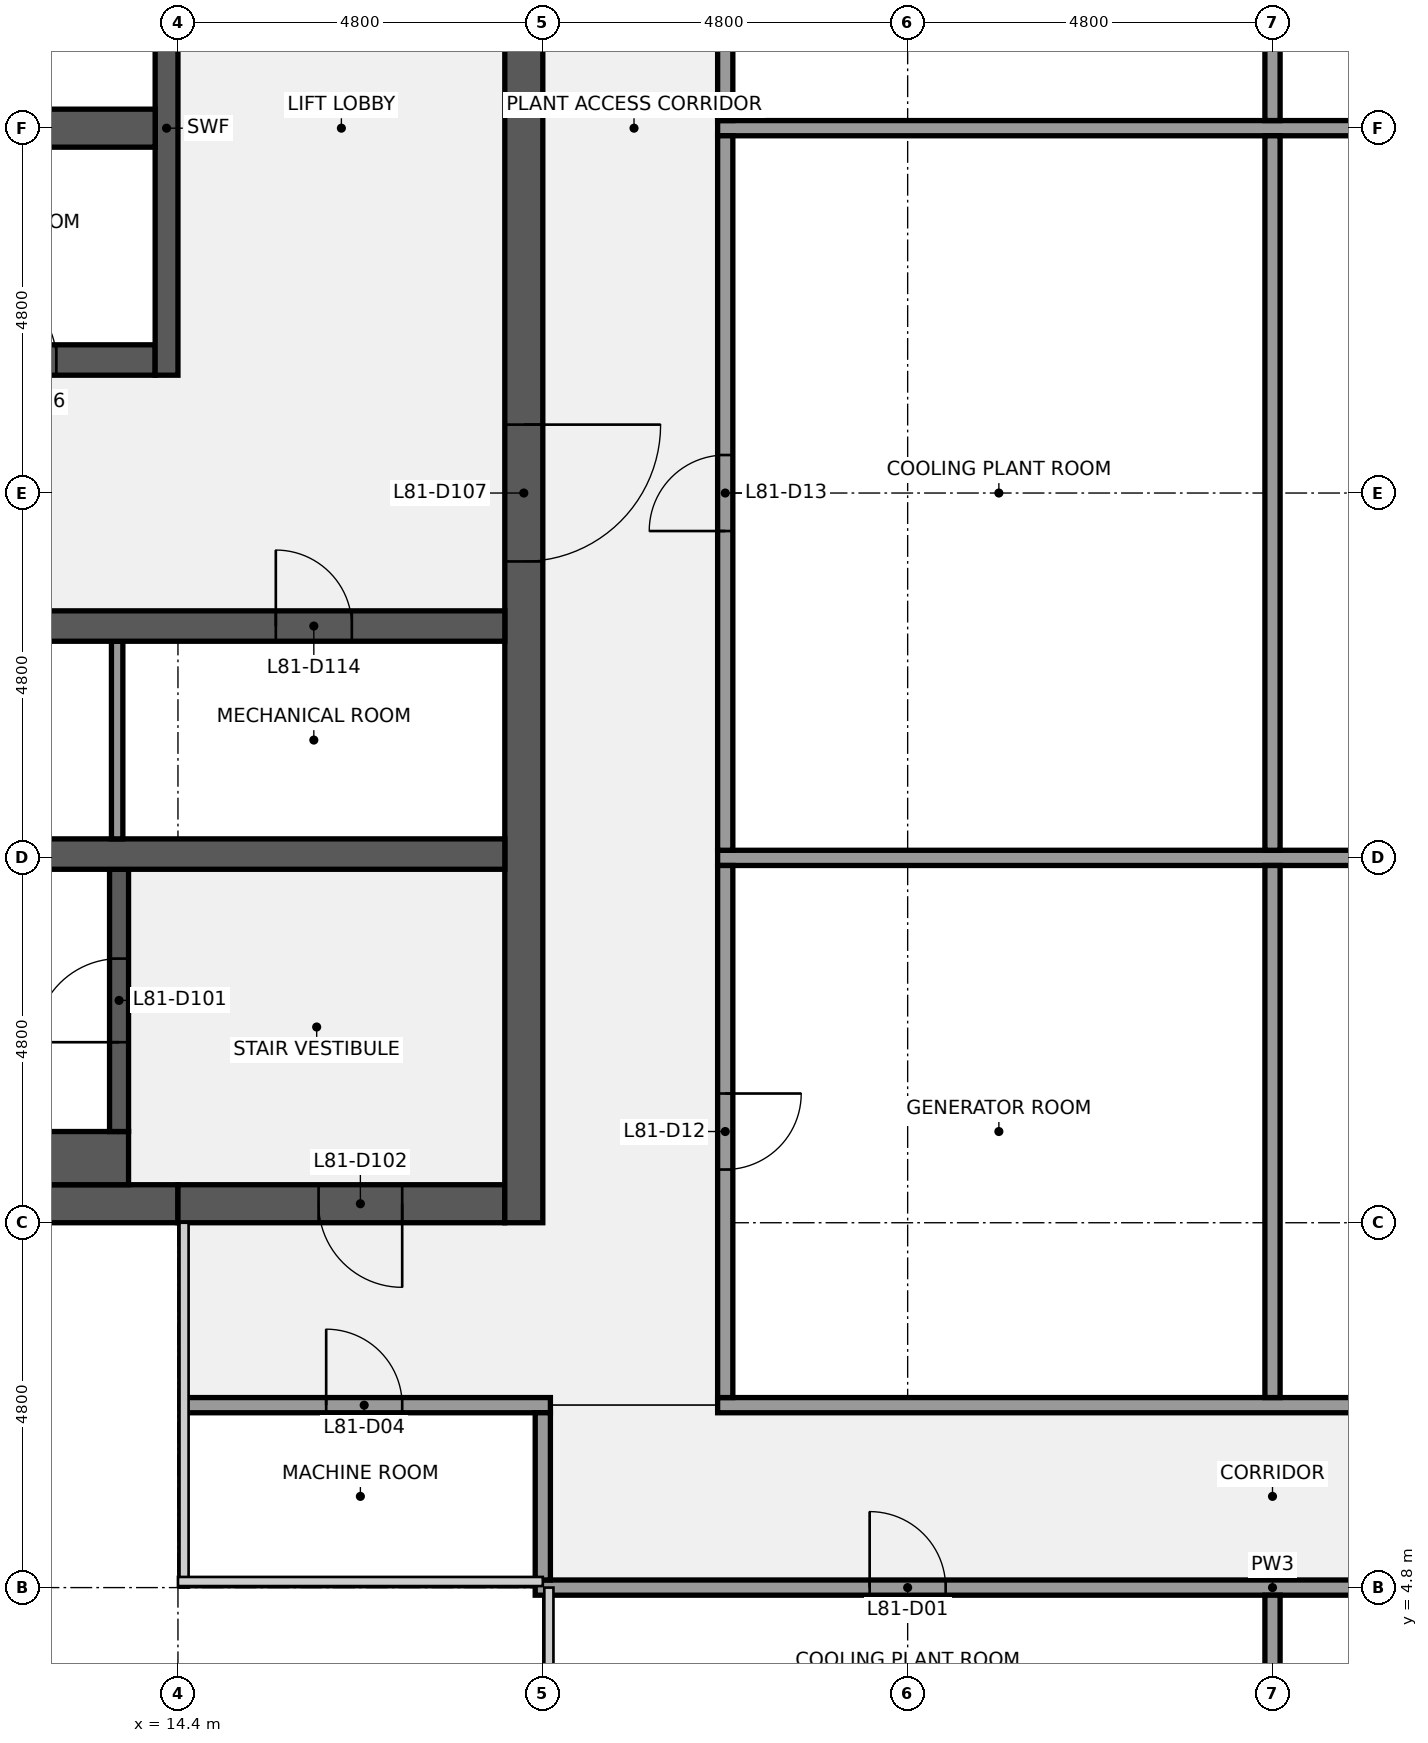
"""IFC4 building model, lengths in metres.
Left out: names, types, materials, properties, quantities, classifications, styles, units other than length and angle.
Written with IfcOpenShell. Run it as: python <this file> out.ifc"""

import sys

from ifc_helpers import new_model, si_unit, direction, frame, frame_2d, origin, place, context, subcontext, project, spatial, rectangle, extrude, element, fill, save


model = new_model("IFC4")
c1 = context("Model", 3, precision=1e-05, world=origin(), true_north=direction((0.0, 1.0)))
c2 = subcontext(c1, "Body", "Model", "MODEL_VIEW")
j1 = project(units=[si_unit("LENGTHUNIT", "METRE"), si_unit("PLANEANGLEUNIT", "RADIAN")], contexts=[c1])
p1 = place(None, origin())
s1 = spatial("IfcSite", under=j1, at=p1, CompositionType="ELEMENT")
p2 = place(p1, origin())
s2 = spatial("IfcBuilding", under=s1, at=p2, CompositionType="ELEMENT")
p3 = place(p2, frame((0.0, 0.0, 362.3)))
s3 = spatial("IfcBuildingStorey", under=s2, at=p3, CompositionType="ELEMENT", Elevation=362.3)
p4 = place(p3, frame((14.4, 9.85, 0.0), z_axis=(0.0, 0.0, 1.0), x_axis=(-1.0, 0.0, 0.0)))
e1 = element("IfcWall", 1, at=p4, inside=s3, PredefinedType="SHEAR", context=c2, shape_type="SweptSolid", body=[
    extrude(rectangle(XDim=13.9, YDim=0.5, at=frame_2d((6.95, 0.0))), origin(), (0.0, 0.0, 1.0), 3.75),
])
p5 = place(p3, frame((18.7, 9.85, 0.0), z_axis=(0.0, 0.0, 1.0), x_axis=(-1.0, 0.0, 0.0)))
e2 = element("IfcWall", 2, at=p5, inside=s3, PredefinedType="SHEAR", context=c2, shape_type="SweptSolid", body=[
    extrude(rectangle(XDim=4.3, YDim=0.5, at=frame_2d((2.15, 0.0))), origin(), (0.0, 0.0, 1.0), 3.75),
])
p6 = place(p5, frame((1.35, 0.0, 0.0)))
e3 = element("IfcOpeningElement", 3, at=p6, cuts=e2, PredefinedType="OPENING", context=c2, shape_type="SweptSolid", body=[
    extrude(rectangle(XDim=1.1, YDim=2.1, at=frame_2d((0.55, 1.05))), frame((0.0, 0.26, 0.0), z_axis=(0.0, -1.0, 0.0), x_axis=(1.0, 0.0, 0.0)), (0.0, 0.0, 1.0), 0.52),
])
p7 = place(p3, frame((18.95, 38.4, 0.0), z_axis=(0.0, 0.0, 1.0), x_axis=(0.0, -1.0, 0.0)))
e4 = element("IfcWall", 4, at=p7, inside=s3, PredefinedType="SHEAR", context=c2, shape_type="SweptSolid", body=[
    extrude(rectangle(XDim=28.8, YDim=0.5, at=frame_2d((14.4, 0.0))), origin(), (0.0, 0.0, 1.0), 3.75),
])
p8 = place(p7, frame((18.3, 0.0, 0.0)))
e5 = element("IfcOpeningElement", 5, at=p8, cuts=e4, PredefinedType="OPENING", context=c2, shape_type="SweptSolid", body=[
    extrude(rectangle(XDim=1.8, YDim=2.1, at=frame_2d((0.9, 1.05))), frame((0.0, 0.26, 0.0), z_axis=(0.0, -1.0, 0.0), x_axis=(1.0, 0.0, 0.0)), (0.0, 0.0, 1.0), 0.52),
])
p9 = place(p7, frame((8.7, 0.0, 0.0)))
e6 = element("IfcOpeningElement", 6, at=p9, cuts=e4, PredefinedType="OPENING", context=c2, shape_type="SweptSolid", body=[
    extrude(rectangle(XDim=1.8, YDim=2.1, at=frame_2d((0.9, 1.05))), frame((0.0, 0.26, 0.0), z_axis=(0.0, -1.0, 0.0), x_axis=(1.0, 0.0, 0.0)), (0.0, 0.0, 1.0), 0.52),
])
p10 = place(p3, frame((6.25, 10.45, 0.0), z_axis=(0.0, 0.0, 1.0), x_axis=(1.0, 0.0, 0.0)))
e7 = element("IfcWall", 7, at=p10, inside=s3, PredefinedType="SHEAR", context=c2, shape_type="SweptSolid", body=[
    extrude(rectangle(XDim=7.5, YDim=0.7, at=frame_2d((3.75, 0.0))), origin(), (0.0, 0.0, 1.0), 3.75),
])
p11 = place(p3, frame((13.625, 10.8, 0.0), z_axis=(0.0, 0.0, 1.0), x_axis=(0.0, 1.0, 0.0)))
e8 = element("IfcWall", 8, at=p11, inside=s3, PredefinedType="SHEAR", context=c2, shape_type="SweptSolid", body=[
    extrude(rectangle(XDim=3.45, YDim=0.25, at=frame_2d((1.725, 0.0))), origin(), (0.0, 0.0, 1.0), 3.75),
])
p12 = place(p11, frame((1.175, 0.0, 0.0)))
e9 = element("IfcOpeningElement", 9, at=p12, cuts=e8, PredefinedType="OPENING", context=c2, shape_type="SweptSolid", body=[
    extrude(rectangle(XDim=1.1, YDim=2.1, at=frame_2d((0.55, 1.05))), frame((0.0, 0.135, 0.0), z_axis=(0.0, -1.0, 0.0), x_axis=(1.0, 0.0, 0.0)), (0.0, 0.0, 1.0), 0.27),
])
p13 = place(p3, frame((0.5, 14.45, 0.0), z_axis=(0.0, 0.0, 1.0), x_axis=(1.0, 0.0, 0.0)))
e10 = element("IfcWall", 10, at=p13, inside=s3, PredefinedType="SHEAR", context=c2, shape_type="SweptSolid", body=[
    extrude(rectangle(XDim=18.2, YDim=0.4, at=frame_2d((9.1, 0.0))), origin(), (0.0, 0.0, 1.0), 3.75),
])
p14 = place(p3, frame((13.6, 14.65, 0.0), z_axis=(0.0, 0.0, 1.0), x_axis=(0.0, 1.0, 0.0)))
e11 = element("IfcWall", 11, at=p14, inside=s3, PredefinedType="PARTITIONING", context=c2, shape_type="SweptSolid", body=[
    extrude(rectangle(XDim=2.6, YDim=0.15, at=frame_2d((1.3, 0.0))), origin(), (0.0, 0.0, 1.0), 3.75),
])
p15 = place(p3, frame((0.5, 17.45, 0.0), z_axis=(0.0, 0.0, 1.0), x_axis=(1.0, 0.0, 0.0)))
e12 = element("IfcWall", 12, at=p15, inside=s3, PredefinedType="SHEAR", context=c2, shape_type="SweptSolid", body=[
    extrude(rectangle(XDim=18.2, YDim=0.4, at=frame_2d((9.1, 0.0))), origin(), (0.0, 0.0, 1.0), 3.75),
])
p16 = place(p15, frame((3.613, 0.0, 0.0)))
e13 = element("IfcOpeningElement", 13, at=p16, cuts=e12, PredefinedType="OPENING", context=c2, shape_type="SweptSolid", body=[
    extrude(rectangle(XDim=1.0, YDim=2.1, at=frame_2d((0.5, 1.05))), frame((0.0, 0.21, 0.0), z_axis=(0.0, -1.0, 0.0), x_axis=(1.0, 0.0, 0.0)), (0.0, 0.0, 1.0), 0.42),
])
p17 = place(p15, frame((10.2, 0.0, 0.0)))
e14 = element("IfcOpeningElement", 14, at=p17, cuts=e12, PredefinedType="OPENING", context=c2, shape_type="SweptSolid", body=[
    extrude(rectangle(XDim=1.0, YDim=2.1, at=frame_2d((0.5, 1.05))), frame((0.0, 0.21, 0.0), z_axis=(0.0, -1.0, 0.0), x_axis=(1.0, 0.0, 0.0)), (0.0, 0.0, 1.0), 0.42),
])
p18 = place(p15, frame((15.188, 0.0, 0.0)))
e15 = element("IfcOpeningElement", 15, at=p18, cuts=e12, PredefinedType="OPENING", context=c2, shape_type="SweptSolid", body=[
    extrude(rectangle(XDim=1.0, YDim=2.1, at=frame_2d((0.5, 1.05))), frame((0.0, 0.21, 0.0), z_axis=(0.0, -1.0, 0.0), x_axis=(1.0, 0.0, 0.0)), (0.0, 0.0, 1.0), 0.42),
])
p19 = place(p3, frame((0.5, 20.95, 0.0), z_axis=(0.0, 0.0, 1.0), x_axis=(1.0, 0.0, 0.0)))
e16 = element("IfcWall", 16, at=p19, inside=s3, PredefinedType="SHEAR", context=c2, shape_type="SweptSolid", body=[
    extrude(rectangle(XDim=13.6, YDim=0.4, at=frame_2d((6.8, 0.0))), origin(), (0.0, 0.0, 1.0), 3.75),
])
p20 = place(p19, frame((6.35, 0.0, 0.0)))
e17 = element("IfcOpeningElement", 17, at=p20, cuts=e16, PredefinedType="OPENING", context=c2, shape_type="SweptSolid", body=[
    extrude(rectangle(XDim=1.1, YDim=2.1, at=frame_2d((0.55, 1.05))), frame((0.0, 0.21, 0.0), z_axis=(0.0, -1.0, 0.0), x_axis=(1.0, 0.0, 0.0)), (0.0, 0.0, 1.0), 0.42),
])
p21 = place(p19, frame((11.3, 0.0, 0.0)))
e18 = element("IfcOpeningElement", 18, at=p21, cuts=e16, PredefinedType="OPENING", context=c2, shape_type="SweptSolid", body=[
    extrude(rectangle(XDim=1.0, YDim=2.1, at=frame_2d((0.5, 1.05))), frame((0.0, 0.21, 0.0), z_axis=(0.0, -1.0, 0.0), x_axis=(1.0, 0.0, 0.0)), (0.0, 0.0, 1.0), 0.42),
])
p22 = place(p3, frame((14.25, 20.75, 0.0), z_axis=(0.0, 0.0, 1.0), x_axis=(0.0, 1.0, 0.0)))
e19 = element("IfcWall", 19, at=p22, inside=s3, PredefinedType="SHEAR", context=c2, shape_type="SweptSolid", body=[
    extrude(rectangle(XDim=6.5, YDim=0.3, at=frame_2d((3.25, 0.0))), origin(), (0.0, 0.0, 1.0), 3.75),
])
p23 = place(p3, frame((0.5, 24.0, 0.0), z_axis=(0.0, 0.0, 1.0), x_axis=(1.0, 0.0, 0.0)))
e20 = element("IfcWall", 20, at=p23, inside=s3, PredefinedType="SHEAR", context=c2, shape_type="SweptSolid", body=[
    extrude(rectangle(XDim=13.6, YDim=0.5, at=frame_2d((6.8, 0.0))), origin(), (0.0, 0.0, 1.0), 3.75),
])
p24 = place(p3, frame((19.1, 4.8, 0.0), z_axis=(0.0, 0.0, 1.0), x_axis=(1.0, 0.0, 0.0)))
e21 = element("IfcWall", 21, at=p24, inside=s3, PredefinedType="PARTITIONING", context=c2, shape_type="SweptSolid", body=[
    extrude(rectangle(XDim=19.4, YDim=0.2, at=frame_2d((9.7, 0.0))), origin(), (0.0, 0.0, 1.0), 2.759),
])
p25 = place(p24, frame((4.4, 0.0, 0.0)))
e22 = element("IfcOpeningElement", 22, at=p25, cuts=e21, PredefinedType="OPENING", context=c2, shape_type="SweptSolid", body=[
    extrude(rectangle(XDim=1.0, YDim=2.1, at=frame_2d((0.5, 1.05))), frame((0.0, 0.11, 0.0), z_axis=(0.0, -1.0, 0.0), x_axis=(1.0, 0.0, 0.0)), (0.0, 0.0, 1.0), 0.22),
])
p26 = place(p24, frame((11.6, 0.0, 0.0)))
e23 = element("IfcOpeningElement", 23, at=p26, cuts=e21, PredefinedType="OPENING", context=c2, shape_type="SweptSolid", body=[
    extrude(rectangle(XDim=1.0, YDim=2.1, at=frame_2d((0.5, 1.05))), frame((0.0, 0.11, 0.0), z_axis=(0.0, -1.0, 0.0), x_axis=(1.0, 0.0, 0.0)), (0.0, 0.0, 1.0), 0.22),
])
p27 = place(p24, frame((16.4, 0.0, 0.0)))
e24 = element("IfcOpeningElement", 24, at=p27, cuts=e21, PredefinedType="OPENING", context=c2, shape_type="SweptSolid", body=[
    extrude(rectangle(XDim=1.0, YDim=2.1, at=frame_2d((0.5, 1.05))), frame((0.0, 0.11, 0.0), z_axis=(0.0, -1.0, 0.0), x_axis=(1.0, 0.0, 0.0)), (0.0, 0.0, 1.0), 0.22),
])
p28 = place(p3, frame((14.5, 7.2, 0.0), z_axis=(0.0, 0.0, 1.0), x_axis=(1.0, 0.0, 0.0)))
e25 = element("IfcWall", 25, at=p28, inside=s3, PredefinedType="PARTITIONING", context=c2, shape_type="SweptSolid", body=[
    extrude(rectangle(XDim=4.8, YDim=0.2, at=frame_2d((2.4, 0.0))), origin(), (0.0, 0.0, 1.0), 2.759),
])
p29 = place(p28, frame((1.85, 0.0, 0.0)))
e26 = element("IfcOpeningElement", 26, at=p29, cuts=e25, PredefinedType="OPENING", context=c2, shape_type="SweptSolid", body=[
    extrude(rectangle(XDim=1.0, YDim=2.1, at=frame_2d((0.5, 1.05))), frame((0.0, 0.11, 0.0), z_axis=(0.0, -1.0, 0.0), x_axis=(1.0, 0.0, 0.0)), (0.0, 0.0, 1.0), 0.22),
])
for number, where, z_axis, x_axis in (
    (27, (21.5, 7.2, 0.0), (0.0, 0.0, 1.0), (1.0, 0.0, 0.0)),
    (28, (21.5, 14.4, 0.0), (0.0, 0.0, 1.0), (1.0, 0.0, 0.0)),
    (29, (21.5, 24.0, 0.0), (0.0, 0.0, 1.0), (1.0, 0.0, 0.0)),
):
    element("IfcWall", number, at=place(p3, frame(where, z_axis=z_axis, x_axis=x_axis)), inside=s3, PredefinedType="PARTITIONING", context=c2, shape_type="SweptSolid", body=[
        extrude(rectangle(XDim=14.6, YDim=0.2, at=frame_2d((7.3, 0.0))), origin(), (0.0, 0.0, 1.0), 2.759),
    ])
p30 = place(p3, frame((19.2, 4.9, 0.0), z_axis=(0.0, 0.0, 1.0), x_axis=(0.0, 1.0, 0.0)))
e30 = element("IfcWall", 30, at=p30, inside=s3, PredefinedType="PARTITIONING", context=c2, shape_type="SweptSolid", body=[
    extrude(rectangle(XDim=2.2, YDim=0.2, at=frame_2d((1.1, 0.0))), origin(), (0.0, 0.0, 1.0), 2.759),
])
p31 = place(p3, frame((21.6, 7.3, 0.0), z_axis=(0.0, 0.0, 1.0), x_axis=(0.0, 1.0, 0.0)))
e31 = element("IfcWall", 31, at=p31, inside=s3, PredefinedType="PARTITIONING", context=c2, shape_type="SweptSolid", body=[
    extrude(rectangle(XDim=7.0, YDim=0.2, at=frame_2d((3.5, 0.0))), origin(), (0.0, 0.0, 1.0), 2.759),
])
p32 = place(p31, frame((3.0, 0.0, 0.0)))
e32 = element("IfcOpeningElement", 32, at=p32, cuts=e31, PredefinedType="OPENING", context=c2, shape_type="SweptSolid", body=[
    extrude(rectangle(XDim=1.0, YDim=2.1, at=frame_2d((0.5, 1.05))), frame((0.0, 0.11, 0.0), z_axis=(0.0, -1.0, 0.0), x_axis=(1.0, 0.0, 0.0)), (0.0, 0.0, 1.0), 0.22),
])
p33 = place(p3, frame((21.6, 14.5, 0.0), z_axis=(0.0, 0.0, 1.0), x_axis=(0.0, 1.0, 0.0)))
e33 = element("IfcWall", 33, at=p33, inside=s3, PredefinedType="PARTITIONING", context=c2, shape_type="SweptSolid", body=[
    extrude(rectangle(XDim=9.4, YDim=0.2, at=frame_2d((4.7, 0.0))), origin(), (0.0, 0.0, 1.0), 2.759),
])
p34 = place(p33, frame((4.2, 0.0, 0.0)))
e34 = element("IfcOpeningElement", 34, at=p34, cuts=e33, PredefinedType="OPENING", context=c2, shape_type="SweptSolid", body=[
    extrude(rectangle(XDim=1.0, YDim=2.1, at=frame_2d((0.5, 1.05))), frame((0.0, 0.11, 0.0), z_axis=(0.0, -1.0, 0.0), x_axis=(1.0, 0.0, 0.0)), (0.0, 0.0, 1.0), 0.22),
])
p35 = place(p3, frame((21.6, 24.1, 0.0), z_axis=(0.0, 0.0, 1.0), x_axis=(0.0, 1.0, 0.0)))
e35 = element("IfcWall", 35, at=p35, inside=s3, PredefinedType="PARTITIONING", context=c2, shape_type="SweptSolid", body=[
    extrude(rectangle(XDim=9.4, YDim=0.2, at=frame_2d((4.7, 0.0))), origin(), (0.0, 0.0, 1.0), 2.759),
])
p36 = place(p35, frame((4.2, 0.0, 0.0)))
e36 = element("IfcOpeningElement", 36, at=p36, cuts=e35, PredefinedType="OPENING", context=c2, shape_type="SweptSolid", body=[
    extrude(rectangle(XDim=1.0, YDim=2.1, at=frame_2d((0.5, 1.05))), frame((0.0, 0.11, 0.0), z_axis=(0.0, -1.0, 0.0), x_axis=(1.0, 0.0, 0.0)), (0.0, 0.0, 1.0), 0.22),
])
p37 = place(p3, frame((28.8, 2.372, 0.0), z_axis=(0.0, 0.0, 1.0), x_axis=(0.0, 1.0, 0.0)))
e37 = element("IfcWall", 37, at=p37, inside=s3, PredefinedType="PARTITIONING", context=c2, shape_type="SweptSolid", body=[
    extrude(rectangle(XDim=2.328, YDim=0.2, at=frame_2d((1.164, 0.0))), origin(), (0.0, 0.0, 1.0), 2.759),
])
p38 = place(p3, frame((28.8, 7.3, 0.0), z_axis=(0.0, 0.0, 1.0), x_axis=(0.0, 1.0, 0.0)))
e38 = element("IfcWall", 38, at=p38, inside=s3, PredefinedType="PARTITIONING", context=c2, shape_type="SweptSolid", body=[
    extrude(rectangle(XDim=7.0, YDim=0.2, at=frame_2d((3.5, 0.0))), origin(), (0.0, 0.0, 1.0), 2.759),
])
for number, where, z_axis, x_axis in (
    (39, (28.8, 14.5, 0.0), (0.0, 0.0, 1.0), (0.0, 1.0, 0.0)),
    (40, (28.8, 24.1, 0.0), (0.0, 0.0, 1.0), (0.0, 1.0, 0.0)),
):
    element("IfcWall", number, at=place(p3, frame(where, z_axis=z_axis, x_axis=x_axis)), inside=s3, PredefinedType="PARTITIONING", context=c2, shape_type="SweptSolid", body=[
        extrude(rectangle(XDim=9.4, YDim=0.2, at=frame_2d((4.7, 0.0))), origin(), (0.0, 0.0, 1.0), 2.759),
    ])
p39 = place(p12, origin())
e41 = element("IfcDoor", 41, at=p39, inside=s3, OperationType="SINGLE_SWING_LEFT", PredefinedType="DOOR", context=c2, shape_type="SweptSolid", body=[
    extrude(rectangle(XDim=1.1, YDim=2.1, at=frame_2d((0.55, 1.05))), frame((0.0, 0.025, 0.0), z_axis=(0.0, -1.0, 0.0), x_axis=(1.0, 0.0, 0.0)), (0.0, 0.0, 1.0), 0.05),
])
fill(e9, e41)
p40 = place(p6, origin())
e42 = element("IfcDoor", 42, at=p40, inside=s3, OperationType="SINGLE_SWING_LEFT", PredefinedType="DOOR", context=c2, shape_type="SweptSolid", body=[
    extrude(rectangle(XDim=1.1, YDim=2.1, at=frame_2d((0.55, 1.05))), frame((0.0, 0.025, 0.0), z_axis=(0.0, -1.0, 0.0), x_axis=(1.0, 0.0, 0.0)), (0.0, 0.0, 1.0), 0.05),
])
fill(e3, e42)
p41 = place(p21, origin())
e43 = element("IfcDoor", 43, at=p41, inside=s3, OperationType="SINGLE_SWING_LEFT", PredefinedType="DOOR", context=c2, shape_type="SweptSolid", body=[
    extrude(rectangle(XDim=1.0, YDim=2.1, at=frame_2d((0.5, 1.05))), frame((0.0, 0.025, 0.0), z_axis=(0.0, -1.0, 0.0), x_axis=(1.0, 0.0, 0.0)), (0.0, 0.0, 1.0), 0.05),
])
fill(e18, e43)
p42 = place(p8, origin())
e44 = element("IfcDoor", 44, at=p42, inside=s3, OperationType="DOUBLE_DOOR_SINGLE_SWING", PredefinedType="DOOR", context=c2, shape_type="SweptSolid", body=[
    extrude(rectangle(XDim=1.8, YDim=2.1, at=frame_2d((0.9, 1.05))), frame((0.0, 0.025, 0.0), z_axis=(0.0, -1.0, 0.0), x_axis=(1.0, 0.0, 0.0)), (0.0, 0.0, 1.0), 0.05),
])
fill(e5, e44)
p43 = place(p18, origin())
e45 = element("IfcDoor", 45, at=p43, inside=s3, OperationType="SINGLE_SWING_LEFT", PredefinedType="DOOR", context=c2, shape_type="SweptSolid", body=[
    extrude(rectangle(XDim=1.0, YDim=2.1, at=frame_2d((0.5, 1.05))), frame((0.0, 0.025, 0.0), z_axis=(0.0, -1.0, 0.0), x_axis=(1.0, 0.0, 0.0)), (0.0, 0.0, 1.0), 0.05),
])
fill(e15, e45)
p44 = place(p25, origin())
e46 = element("IfcDoor", 46, at=p44, inside=s3, OperationType="SINGLE_SWING_LEFT", PredefinedType="DOOR", context=c2, shape_type="SweptSolid", body=[
    extrude(rectangle(XDim=1.0, YDim=2.1, at=frame_2d((0.5, 1.05))), frame((0.0, 0.025, 0.0), z_axis=(0.0, -1.0, 0.0), x_axis=(1.0, 0.0, 0.0)), (0.0, 0.0, 1.0), 0.05),
])
fill(e22, e46)
p45 = place(p29, origin())
e47 = element("IfcDoor", 47, at=p45, inside=s3, OperationType="SINGLE_SWING_LEFT", PredefinedType="DOOR", context=c2, shape_type="SweptSolid", body=[
    extrude(rectangle(XDim=1.0, YDim=2.1, at=frame_2d((0.5, 1.05))), frame((0.0, 0.025, 0.0), z_axis=(0.0, -1.0, 0.0), x_axis=(1.0, 0.0, 0.0)), (0.0, 0.0, 1.0), 0.05),
])
fill(e26, e47)
p46 = place(p32, origin())
e48 = element("IfcDoor", 48, at=p46, inside=s3, OperationType="SINGLE_SWING_RIGHT", PredefinedType="DOOR", context=c2, shape_type="SweptSolid", body=[
    extrude(rectangle(XDim=1.0, YDim=2.1, at=frame_2d((0.5, 1.05))), frame((0.0, 0.025, 0.0), z_axis=(0.0, -1.0, 0.0), x_axis=(1.0, 0.0, 0.0)), (0.0, 0.0, 1.0), 0.05),
])
fill(e32, e48)
p47 = place(p34, origin())
e49 = element("IfcDoor", 49, at=p47, inside=s3, OperationType="SINGLE_SWING_LEFT", PredefinedType="DOOR", context=c2, shape_type="SweptSolid", body=[
    extrude(rectangle(XDim=1.0, YDim=2.1, at=frame_2d((0.5, 1.05))), frame((0.0, 0.025, 0.0), z_axis=(0.0, -1.0, 0.0), x_axis=(1.0, 0.0, 0.0)), (0.0, 0.0, 1.0), 0.05),
])
fill(e34, e49)
save(model, sys.argv[1])
